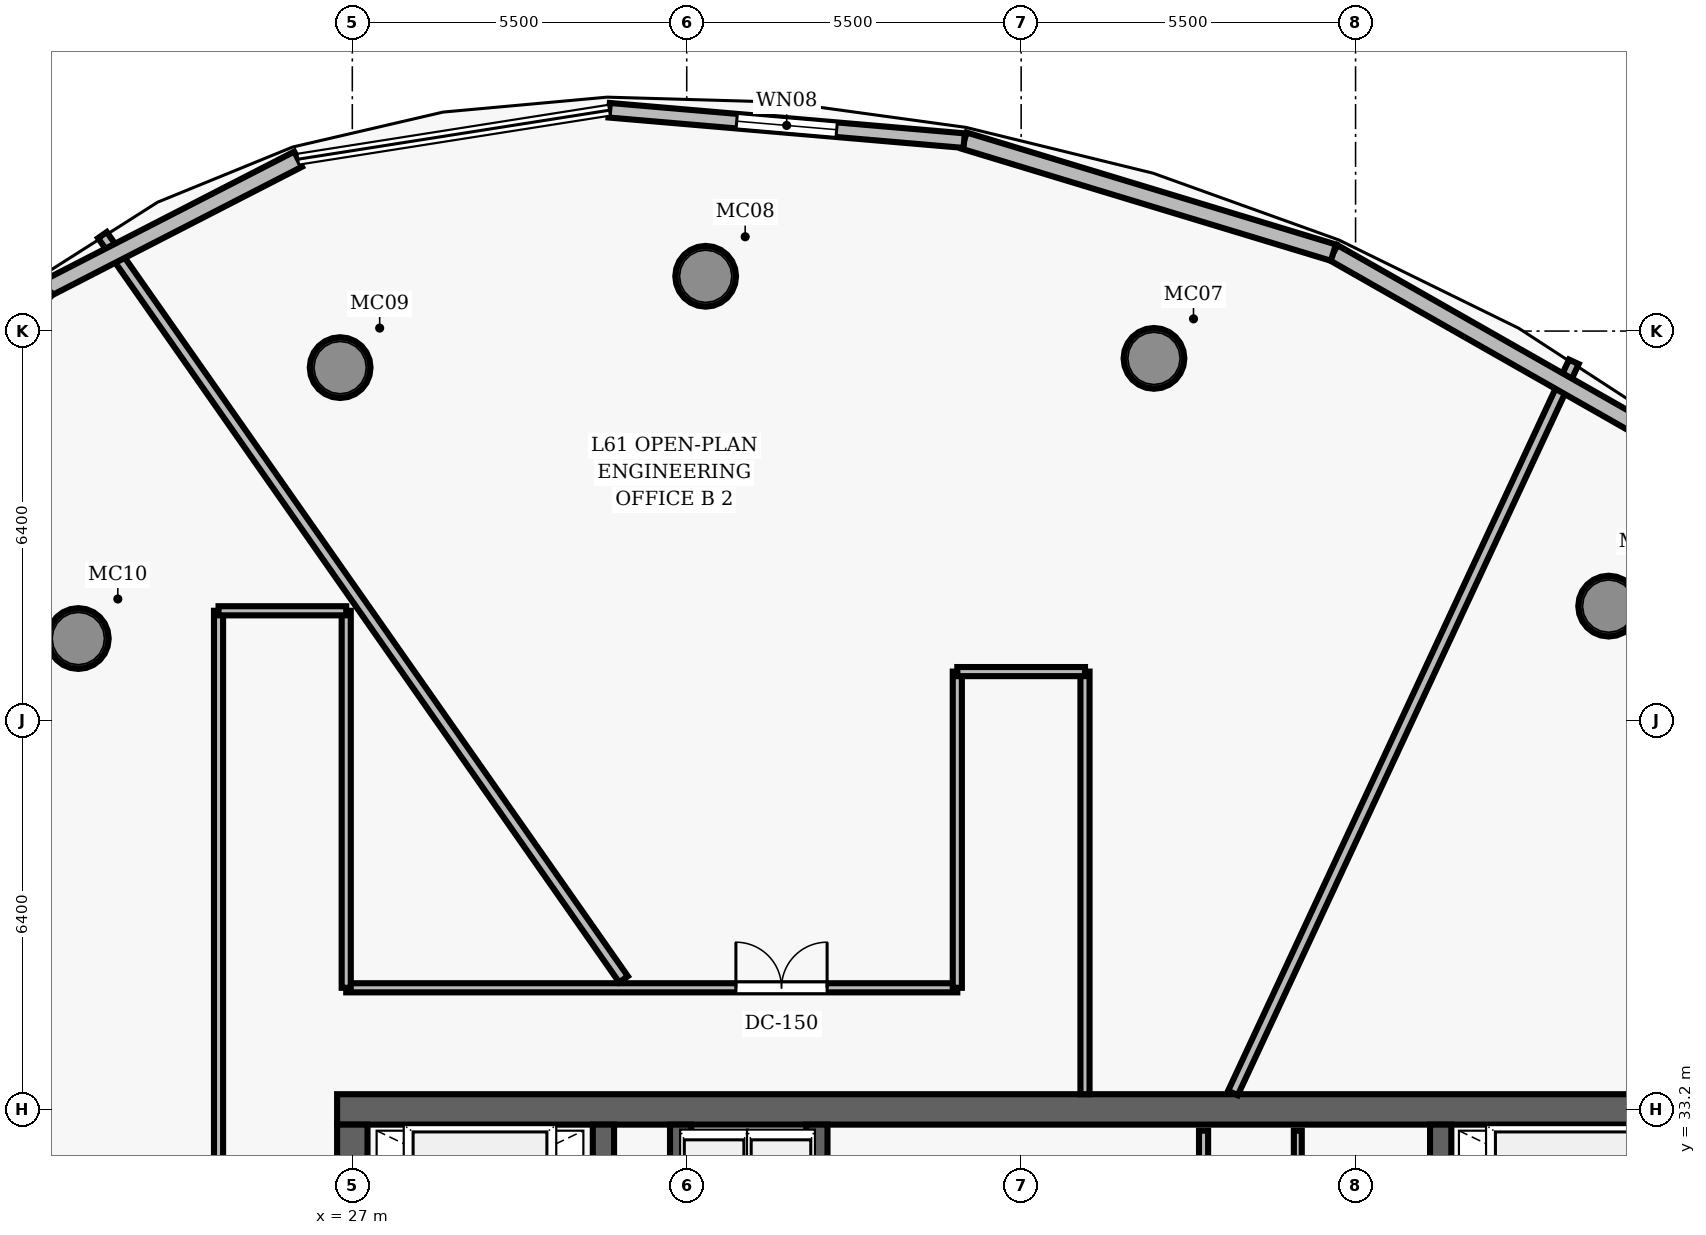
"""IFC4 building model, lengths in metres.
Left out: names, types, materials, properties, quantities, classifications, styles, units other than length and angle.
Written with IfcOpenShell. Run it as: python <this file> out.ifc"""

import sys

from ifc_helpers import new_model, si_unit, direction, frame, frame_2d, origin, origin_2d, place, context, subcontext, project, spatial, rectangle, hollow_circle, extrude, element, fill, save


model = new_model("IFC4")
c1 = context("Model", 3, precision=1e-05, world=origin(), true_north=direction((0.0, 1.0)))
c2 = subcontext(c1, "Body", "Model", "MODEL_VIEW")
j1 = project(units=[si_unit("LENGTHUNIT", "METRE"), si_unit("PLANEANGLEUNIT", "RADIAN")], contexts=[c1])
p1 = place(None, origin())
s1 = spatial("IfcSite", under=j1, at=p1, CompositionType="ELEMENT")
p2 = place(p1, origin())
s2 = spatial("IfcBuilding", under=s1, at=p2, CompositionType="ELEMENT")
p3 = place(p2, frame((0.0, 0.0, 242.05)))
s3 = spatial("IfcBuildingStorey", under=s2, at=p3, CompositionType="ELEMENT", Elevation=242.05)
p4 = place(p3, frame((26.75, 33.2, 0.0), z_axis=(0.0, 0.0, 1.0), x_axis=(1.0, 0.0, 0.0)))
e1 = element("IfcWall", 1, at=p4, inside=s3, PredefinedType="SHEAR", context=c2, shape_type="SweptSolid", body=[
    extrude(rectangle(XDim=22.5, YDim=0.5, at=frame_2d((11.25, 0.0))), origin(), (0.0, 0.0, 1.0), 3.85),
])
p5 = place(p3, frame((27.0, 19.05, 0.0), z_axis=(0.0, 0.0, 1.0), x_axis=(0.0, 1.0, 0.0)))
e2 = element("IfcWall", 2, at=p5, inside=s3, PredefinedType="SHEAR", context=c2, shape_type="SweptSolid", body=[
    extrude(rectangle(XDim=13.9, YDim=0.5, at=frame_2d((6.95, 0.0))), origin(), (0.0, 0.0, 1.0), 3.85),
])
p6 = place(p5, frame((8.2, 0.0, 0.0)))
e3 = element("IfcOpeningElement", 3, at=p6, cuts=e2, PredefinedType="OPENING", context=c2, shape_type="SweptSolid", body=[
    extrude(rectangle(XDim=1.05, YDim=2.15, at=frame_2d((0.525, 1.075))), frame((0.0, 0.26, 0.0), z_axis=(0.0, -1.0, 0.0), x_axis=(1.0, 0.0, 0.0)), (0.0, 0.0, 1.0), 0.52),
])
for number, where, z_axis, x_axis in (
    (4, (31.13, 19.05, 0.0), (0.0, 0.0, 1.0), (0.0, 1.0, 0.0)),
    (5, (44.9, 19.05, 0.0), (0.0, 0.0, 1.0), (0.0, 1.0, 0.0)),
):
    element("IfcWall", number, at=place(p3, frame(where, z_axis=z_axis, x_axis=x_axis)), inside=s3, PredefinedType="SHEAR", context=c2, shape_type="SweptSolid", body=[
        extrude(rectangle(XDim=13.9, YDim=0.35, at=frame_2d((6.95, 0.0))), origin(), (0.0, 0.0, 1.0), 3.85),
    ])
for number, where, z_axis, x_axis in (
    (6, (47.662, 41.477, 0.0), (0.0, 0.0, 1.0), (1.0, 0.0, 0.0)),
    (7, (40.185, 45.551, 0.0), (0.0, 0.0, 1.0), (1.0, 0.0, 0.0)),
    (8, (32.812, 46.901, 0.0), (0.0, 0.0, 1.0), (1.0, 0.0, 0.0)),
    (9, (26.8, 45.399, 0.0), (0.0, 0.0, 1.0), (1.0, 0.0, 0.0)),
    (10, (22.494, 40.944, 0.0), (0.0, 0.0, 1.0), (1.0, 0.0, 0.0)),
):
    element("IfcColumn", number, at=place(p3, frame(where, z_axis=z_axis, x_axis=x_axis)), inside=s3, PredefinedType="COLUMN", context=c2, shape_type="SweptSolid", body=[
        extrude(hollow_circle(Radius=0.5, WallThickness=0.045, at=origin_2d()), origin(), (0.0, 0.0, 1.0), 3.85),
    ])
p7 = place(p3, frame((34.64, 26.69, 0.0), z_axis=(0.0, 0.0, 1.0), x_axis=(0.0, 1.0, 0.0)))
e11 = element("IfcWall", 11, at=p7, inside=s3, PredefinedType="SHEAR", context=c2, shape_type="SweptSolid", body=[
    extrude(rectangle(XDim=6.26, YDim=0.35, at=frame_2d((3.13, 0.0))), origin(), (0.0, 0.0, 1.0), 3.85),
])
p8 = place(p7, frame((0.85, 0.0, 0.0)))
e12 = element("IfcOpeningElement", 12, at=p8, cuts=e11, PredefinedType="OPENING", context=c2, shape_type="SweptSolid", body=[
    extrude(rectangle(XDim=1.05, YDim=2.15, at=frame_2d((0.525, 1.075))), frame((0.0, 0.185, 0.0), z_axis=(0.0, -1.0, 0.0), x_axis=(1.0, 0.0, 0.0)), (0.0, 0.0, 1.0), 0.37),
])
p9 = place(p3, frame((32.4, 30.22, 0.0), z_axis=(0.0, 0.0, 1.0), x_axis=(0.0, 1.0, 0.0)))
e13 = element("IfcWall", 13, at=p9, inside=s3, PredefinedType="SHEAR", context=c2, shape_type="SweptSolid", body=[
    extrude(rectangle(XDim=2.73, YDim=0.35, at=frame_2d((1.365, 0.0))), origin(), (0.0, 0.0, 1.0), 3.04),
])
p10 = place(p3, frame((41.0, 28.95, 0.0), z_axis=(0.0, 0.0, 1.0), x_axis=(0.0, 1.0, 0.0)))
e14 = element("IfcWall", 14, at=p10, inside=s3, PredefinedType="PARTITIONING", context=c2, shape_type="SweptSolid", body=[
    extrude(rectangle(XDim=3.9, YDim=0.15, at=frame_2d((1.95, 0.0))), origin(), (0.0, 0.0, 1.0), 3.04),
])
p11 = place(p10, frame((0.7, 0.0, 0.0)))
e15 = element("IfcOpeningElement", 15, at=p11, cuts=e14, PredefinedType="OPENING", context=c2, shape_type="SweptSolid", body=[
    extrude(rectangle(XDim=0.85, YDim=2.1, at=frame_2d((0.425, 1.05))), frame((0.0, 0.085, 0.0), z_axis=(0.0, -1.0, 0.0), x_axis=(1.0, 0.0, 0.0)), (0.0, 0.0, 1.0), 0.17),
])
p12 = place(p3, frame((42.55, 28.1, 0.0), z_axis=(0.0, 0.0, 1.0), x_axis=(0.0, 1.0, 0.0)))
e16 = element("IfcWall", 16, at=p12, inside=s3, PredefinedType="PARTITIONING", context=c2, shape_type="SweptSolid", body=[
    extrude(rectangle(XDim=4.75, YDim=0.13, at=frame_2d((2.375, 0.0))), origin(), (0.0, 0.0, 1.0), 3.04),
])
p13 = place(p12, frame((1.4, 0.0, 0.0)))
e17 = element("IfcOpeningElement", 17, at=p13, cuts=e16, PredefinedType="OPENING", context=c2, shape_type="SweptSolid", body=[
    extrude(rectangle(XDim=0.85, YDim=2.1, at=frame_2d((0.425, 1.05))), frame((0.0, 0.075, 0.0), z_axis=(0.0, -1.0, 0.0), x_axis=(1.0, 0.0, 0.0)), (0.0, 0.0, 1.0), 0.15),
])
p14 = place(p3, frame((26.9, 35.2, 0.0), z_axis=(0.0, 0.0, 1.0), x_axis=(1.0, 0.0, 0.0)))
e18 = element("IfcWall", 18, at=p14, inside=s3, PredefinedType="PARTITIONING", context=c2, shape_type="SweptSolid", body=[
    extrude(rectangle(XDim=10.05, YDim=0.15, at=frame_2d((5.025, 0.0))), origin(), (0.0, 0.0, 1.0), 3.04),
])
p15 = place(p14, frame((6.409, 0.0, 0.0)))
e19 = element("IfcOpeningElement", 19, at=p15, cuts=e18, PredefinedType="OPENING", context=c2, shape_type="SweptSolid", body=[
    extrude(rectangle(XDim=1.5, YDim=2.2, at=frame_2d((0.75, 1.1))), frame((0.0, 0.085, 0.0), z_axis=(0.0, -1.0, 0.0), x_axis=(1.0, 0.0, 0.0)), (0.0, 0.0, 1.0), 0.17),
])
p16 = place(p3, frame((24.8, 11.268, 0.0), z_axis=(0.0, 0.0, 1.0), x_axis=(0.0, 1.0, 0.0)))
e20 = element("IfcWall", 20, at=p16, inside=s3, PredefinedType="PARTITIONING", context=c2, shape_type="SweptSolid", body=[
    extrude(rectangle(XDim=30.132, YDim=0.15, at=frame_2d((15.066, 0.0))), origin(), (0.0, 0.0, 1.0), 3.04),
])
p17 = place(p16, frame((16.736, 0.0, 0.0)))
e21 = element("IfcOpeningElement", 21, at=p17, cuts=e20, PredefinedType="OPENING", context=c2, shape_type="SweptSolid", body=[
    extrude(rectangle(XDim=1.5, YDim=2.2, at=frame_2d((0.75, 1.1))), frame((0.0, 0.085, 0.0), z_axis=(0.0, -1.0, 0.0), x_axis=(1.0, 0.0, 0.0)), (0.0, 0.0, 1.0), 0.17),
])
p18 = place(p16, frame((9.648, 0.0, 0.0)))
e22 = element("IfcOpeningElement", 22, at=p18, cuts=e20, PredefinedType="OPENING", context=c2, shape_type="SweptSolid", body=[
    extrude(rectangle(XDim=1.5, YDim=2.2, at=frame_2d((0.75, 1.1))), frame((0.0, 0.085, 0.0), z_axis=(0.0, -1.0, 0.0), x_axis=(1.0, 0.0, 0.0)), (0.0, 0.0, 1.0), 0.17),
])
p19 = place(p3, frame((26.9, 35.2, 0.0), z_axis=(0.0, 0.0, 1.0), x_axis=(0.0, 1.0, 0.0)))
e23 = element("IfcWall", 23, at=p19, inside=s3, PredefinedType="PARTITIONING", context=c2, shape_type="SweptSolid", body=[
    extrude(rectangle(XDim=6.2, YDim=0.15, at=frame_2d((3.1, 0.0))), origin(), (0.0, 0.0, 1.0), 3.04),
])
p20 = place(p3, frame((24.8, 41.4, 0.0), z_axis=(0.0, 0.0, 1.0), x_axis=(1.0, 0.0, 0.0)))
e24 = element("IfcWall", 24, at=p20, inside=s3, PredefinedType="PARTITIONING", context=c2, shape_type="SweptSolid", body=[
    extrude(rectangle(XDim=2.1, YDim=0.15, at=frame_2d((1.05, 0.0))), origin(), (0.0, 0.0, 1.0), 3.04),
])
p21 = place(p3, frame((36.95, 35.2, 0.0), z_axis=(0.0, 0.0, 1.0), x_axis=(0.0, 1.0, 0.0)))
e25 = element("IfcWall", 25, at=p21, inside=s3, PredefinedType="PARTITIONING", context=c2, shape_type="SweptSolid", body=[
    extrude(rectangle(XDim=5.2, YDim=0.15, at=frame_2d((2.6, 0.0))), origin(), (0.0, 0.0, 1.0), 3.04),
])
p22 = place(p3, frame((39.05, 33.45, 0.0), z_axis=(0.0, 0.0, 1.0), x_axis=(0.0, 1.0, 0.0)))
e26 = element("IfcWall", 26, at=p22, inside=s3, PredefinedType="PARTITIONING", context=c2, shape_type="SweptSolid", body=[
    extrude(rectangle(XDim=6.95, YDim=0.15, at=frame_2d((3.475, 0.0))), origin(), (0.0, 0.0, 1.0), 3.04),
])
p23 = place(p3, frame((36.95, 40.4, 0.0), z_axis=(0.0, 0.0, 1.0), x_axis=(1.0, 0.0, 0.0)))
e27 = element("IfcWall", 27, at=p23, inside=s3, PredefinedType="PARTITIONING", context=c2, shape_type="SweptSolid", body=[
    extrude(rectangle(XDim=2.1, YDim=0.15, at=frame_2d((1.05, 0.0))), origin(), (0.0, 0.0, 1.0), 3.04),
])
p24 = place(p3, frame((41.483, 33.47, 0.0), z_axis=(0.0, 0.0, 1.0), x_axis=(0.422609422838, 0.906311908632, 0.0)))
e28 = element("IfcWall", 28, at=p24, inside=s3, PredefinedType="PARTITIONING", context=c2, shape_type="SweptSolid", body=[
    extrude(rectangle(XDim=13.267, YDim=0.175, at=frame_2d((6.634, 0.0))), origin(), (0.0, 0.0, 1.0), 3.04),
])
p25 = place(p3, frame((31.46, 35.34, 0.0), z_axis=(0.0, 0.0, 1.0), x_axis=(-0.573590650074, 0.819142091549, 0.0)))
e29 = element("IfcWall", 29, at=p25, inside=s3, PredefinedType="PARTITIONING", context=c2, shape_type="SweptSolid", body=[
    extrude(rectangle(XDim=14.941, YDim=0.175, at=frame_2d((7.47, 0.0))), origin(), (0.0, 0.0, 1.0), 3.04),
])
p26 = place(p3, frame((43.135, 47.29, 0.0), z_axis=(0.0, 0.0, 1.0), x_axis=(0.869128067122, -0.494587103492, 0.0)))
e30 = element("IfcWall", 30, at=p26, inside=s3, PredefinedType="SOLIDWALL", context=c2, shape_type="SweptSolid", body=[
    extrude(rectangle(XDim=6.526, YDim=0.28, at=frame_2d((3.263, 0.0))), origin(), (0.0, 0.0, 1.0), 3.625),
])
p27 = place(p3, frame((37.063, 49.132, 0.0), z_axis=(0.0, 0.0, 1.0), x_axis=(0.956967430601, -0.290195342431, 0.0)))
e31 = element("IfcWall", 31, at=p27, inside=s3, PredefinedType="SOLIDWALL", context=c2, shape_type="SweptSolid", body=[
    extrude(rectangle(XDim=6.345, YDim=0.28, at=frame_2d((3.172, 0.0))), origin(), (0.0, 0.0, 1.0), 3.625),
])
p28 = place(p3, frame((31.225, 49.632, 0.0), z_axis=(0.0, 0.0, 1.0), x_axis=(0.996353229665, -0.085324332609, 0.0)))
e32 = element("IfcWall", 32, at=p28, inside=s3, PredefinedType="SOLIDWALL", context=c2, shape_type="SweptSolid", body=[
    extrude(rectangle(XDim=5.86, YDim=0.24, at=frame_2d((2.93, 0.0))), origin(), (0.0, 0.0, 1.0), 3.625),
])
p29 = place(p28, frame((2.105, 0.0, 0.85)))
e33 = element("IfcOpeningElement", 33, at=p29, cuts=e32, PredefinedType="OPENING", context=c2, shape_type="SweptSolid", body=[
    extrude(rectangle(XDim=1.65, YDim=1.95, at=frame_2d((0.825, 0.975))), frame((0.0, 0.13, 0.0), z_axis=(0.0, -1.0, 0.0), x_axis=(1.0, 0.0, 0.0)), (0.0, 0.0, 1.0), 0.26),
])
p30 = place(p3, frame((21.972, 46.7, 0.0), z_axis=(0.0, 0.0, 1.0), x_axis=(0.889373798751, 0.457180758666, 0.0)))
e34 = element("IfcWall", 34, at=p30, inside=s3, PredefinedType="SOLIDWALL", context=c2, shape_type="SweptSolid", body=[
    extrude(rectangle(XDim=4.651, YDim=0.28, at=frame_2d((2.325, 0.0))), origin(), (0.0, 0.0, 1.0), 3.625),
])
p31 = place(p3, frame((18.878, 43.228, 0.0), z_axis=(0.0, 0.0, 1.0), x_axis=(0.665305013969, 0.746571656566, 0.0)))
e35 = element("IfcWall", 35, at=p31, inside=s3, PredefinedType="SOLIDWALL", context=c2, shape_type="SweptSolid", body=[
    extrude(rectangle(XDim=4.65, YDim=0.28, at=frame_2d((2.325, 0.0))), origin(), (0.0, 0.0, 1.0), 3.625),
])
p32 = place(p15, origin())
e36 = element("IfcDoor", 36, at=p32, inside=s3, OperationType="DOUBLE_DOOR_SINGLE_SWING", PredefinedType="DOOR", context=c2, shape_type="SweptSolid", body=[
    extrude(rectangle(XDim=1.5, YDim=2.2, at=frame_2d((0.75, 1.1))), frame((0.0, 0.025, 0.0), z_axis=(0.0, -1.0, 0.0), x_axis=(1.0, 0.0, 0.0)), (0.0, 0.0, 1.0), 0.05),
])
fill(e19, e36)
p33 = place(p29, origin())
e37 = element("IfcWindow", 37, at=p33, inside=s3, PartitioningType="SINGLE_PANEL", PredefinedType="WINDOW", context=c2, shape_type="SweptSolid", body=[
    extrude(rectangle(XDim=1.65, YDim=1.95, at=frame_2d((0.825, 0.975))), frame((0.0, 0.03, 0.0), z_axis=(0.0, -1.0, 0.0), x_axis=(1.0, 0.0, 0.0)), (0.0, 0.0, 1.0), 0.06),
])
fill(e33, e37)
save(model, sys.argv[1])
